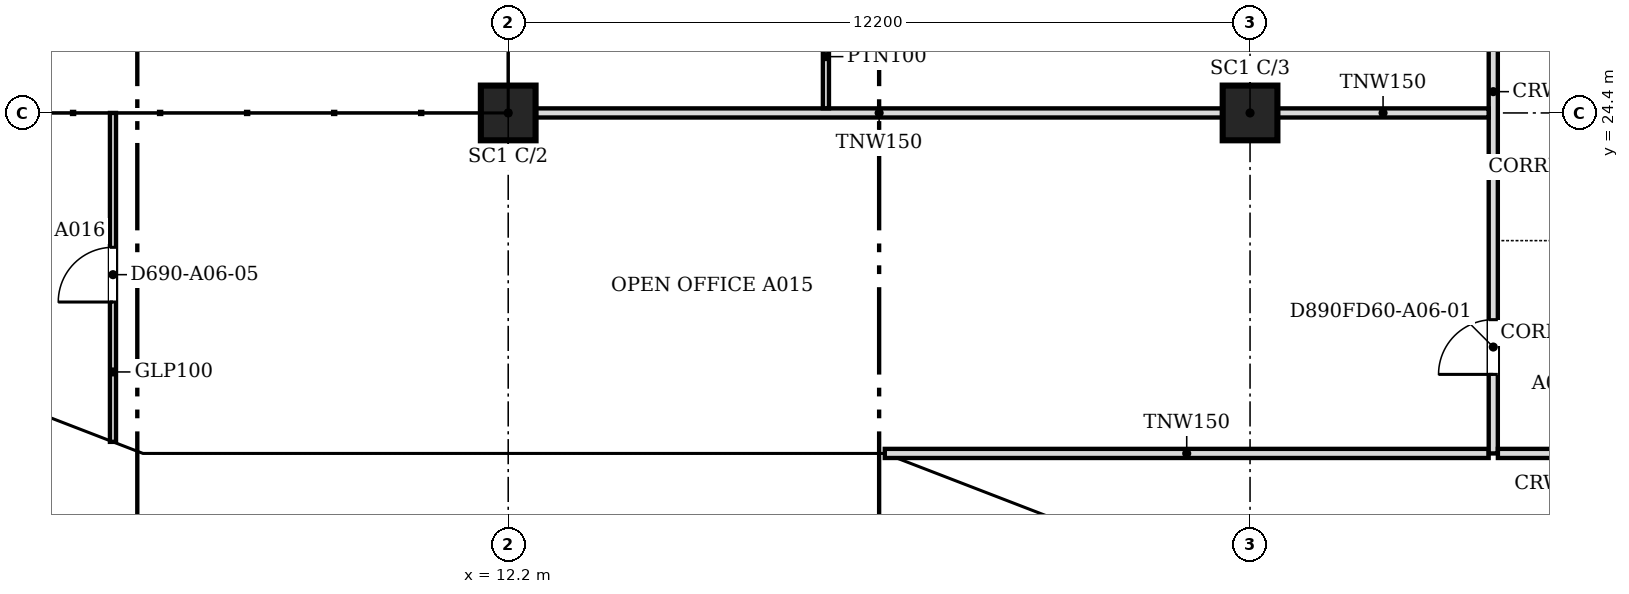
"""IFC4 building model, lengths in metres.
Left out: names, types, materials, properties, quantities, classifications, styles, units other than length and angle.
Written with IfcOpenShell. Run it as: python <this file> out.ifc"""

import sys

from ifc_helpers import new_model, si_unit, direction, frame, frame_2d, origin, origin_2d, place, context, subcontext, project, spatial, polyline, rectangle, outline, extrude, faceted_brep, source, transform, mapped, element, fill, save


model = new_model("IFC4")
c1 = context("Model", 3, precision=1e-05, world=origin(), true_north=direction((0.0, 1.0)))
c2 = subcontext(c1, "Body", "Model", "MODEL_VIEW")
j1 = project(units=[si_unit("LENGTHUNIT", "METRE"), si_unit("PLANEANGLEUNIT", "RADIAN")], contexts=[c1])
p1 = place(None, origin())
s1 = spatial("IfcSite", under=j1, at=p1, CompositionType="ELEMENT")
p2 = place(p1, origin())
s2 = spatial("IfcBuilding", under=s1, at=p2, CompositionType="ELEMENT")
p3 = place(p2, frame((0.0, 0.0, 68.6)))
s3 = spatial("IfcBuildingStorey", under=s2, at=p3, CompositionType="ELEMENT", Elevation=68.6)
for number, where, z_axis, x_axis in (
    (1, (12.2, 24.4, 0.0), (0.0, 0.0, 1.0), (1.0, 0.0, 0.0)),
    (2, (24.4, 24.4, 0.0), (0.0, 0.0, 1.0), (1.0, 0.0, 0.0)),
):
    element("IfcColumn", number, at=place(p3, frame(where, z_axis=z_axis, x_axis=x_axis)), inside=s3, PredefinedType="COLUMN", context=c2, shape_type="SweptSolid", body=[
        extrude(rectangle(XDim=0.9, YDim=0.9, at=origin_2d()), origin(), (0.0, 0.0, 1.0), 3.6),
    ])
m1 = source(origin(), c2, "Body", "Brep", [
    faceted_brep([(2.997, -0.25, 3.741), (2.95, -0.25, 3.8), (0.0, -0.25, 0.0), (2.997, -0.25, 0.0), (0.053, 0.25, 0.068), (2.904, 0.25, 3.74), (2.904, 0.25, 0.0), (0.053, 0.25, 0.0), (2.95, 0.0, 3.8), (0.0, 0.0, 0.0)], [[[0, 1, 2, 3]], [[4, 5, 6, 7]], [[8, 1, 0]], [[5, 4, 9, 2, 1, 8]], [[7, 6, 3, 2, 9]], [[7, 9, 4]], [[3, 6, 5, 8, 0]]]),
])
p4 = place(p3, frame((3.394, 19.612, 0.0), z_axis=(0.0, 0.0, 1.0), x_axis=(0.932990326376, -0.359901446078, 0.0)))
e3 = element("IfcWall", 3, at=p4, inside=s3, PredefinedType="SOLIDWALL", context=c2, shape_type="MappedRepresentation", body=[
    mapped(m1, transform((0.0, 0.0, 0.0), scale=1.0)),
])
m2 = source(origin(), c2, "Body", "SweptSolid", [
    extrude(outline(polyline([(2.75, 3.135), (0.511, 0.25), (2.75, 0.25), (2.75, 3.135)])), frame((0.0, 0.26, 0.0), z_axis=(0.0, -1.0, 0.0), x_axis=(1.0, 0.0, 0.0)), (0.0, 0.0, 1.0), 0.52),
])
p5 = place(p4, origin())
e4 = element("IfcOpeningElement", 4, at=p5, cuts=e3, PredefinedType="OPENING", context=c2, shape_type="MappedRepresentation", body=[
    mapped(m2, transform((0.0, 0.0, 0.0), scale=1.0)),
])
m3 = source(origin(), c2, "Body", "Brep", [
    faceted_brep([(3.05, -0.25, 0.0), (0.047, -0.25, 3.8), (0.0, -0.25, 3.74), (0.0, -0.25, 0.0), (0.093, 0.25, 3.741), (3.05, 0.25, 0.0), (0.093, 0.25, 0.0), (0.047, 0.0, 3.8)], [[[0, 1, 2, 3]], [[4, 5, 6]], [[5, 4, 7, 1, 0]], [[2, 1, 7]], [[6, 5, 0, 3]], [[6, 3, 2, 7, 4]]]),
])
p6 = place(p3, frame((6.1, 18.55, 0.0), z_axis=(0.0, 0.0, 1.0), x_axis=(1.0, 0.0, 0.0)))
e5 = element("IfcWall", 5, at=p6, inside=s3, PredefinedType="SOLIDWALL", context=c2, shape_type="MappedRepresentation", body=[
    mapped(m3, transform((0.0, 0.0, 0.0), scale=1.0)),
])
m4 = source(origin(), c2, "Body", "SweptSolid", [
    extrude(outline(polyline([(2.534, 0.25), (0.247, 3.144), (0.247, 0.25), (2.534, 0.25)])), frame((0.0, 0.26, 0.0), z_axis=(0.0, -1.0, 0.0), x_axis=(1.0, 0.0, 0.0)), (0.0, 0.0, 1.0), 0.52),
])
p7 = place(p6, origin())
e6 = element("IfcOpeningElement", 6, at=p7, cuts=e5, PredefinedType="OPENING", context=c2, shape_type="MappedRepresentation", body=[
    mapped(m4, transform((0.0, 0.0, 0.0), scale=1.0)),
])
m5 = source(origin(), c2, "Body", "SweptSolid", [
    extrude(outline(polyline([(6.1, 0.0), (3.05, 3.8), (0.0, 0.0), (6.1, 0.0)])), frame((0.0, 0.25, 0.0), z_axis=(0.0, -1.0, 0.0), x_axis=(1.0, 0.0, 0.0)), (0.0, 0.0, 1.0), 0.5),
])
p8 = place(p3, frame((9.15, 18.55, 0.0), z_axis=(0.0, 0.0, 1.0), x_axis=(1.0, 0.0, 0.0)))
e7 = element("IfcWall", 7, at=p8, inside=s3, PredefinedType="SOLIDWALL", context=c2, shape_type="MappedRepresentation", body=[
    mapped(m5, transform((0.0, 0.0, 0.0), scale=1.0)),
])
m6 = source(origin(), c2, "Body", "SweptSolid", [
    extrude(outline(polyline([(5.579, 0.25), (3.05, 3.4), (0.521, 0.25), (5.579, 0.25)])), frame((0.0, 0.26, 0.0), z_axis=(0.0, -1.0, 0.0), x_axis=(1.0, 0.0, 0.0)), (0.0, 0.0, 1.0), 0.52),
])
p9 = place(p8, origin())
e8 = element("IfcOpeningElement", 8, at=p9, cuts=e7, PredefinedType="OPENING", context=c2, shape_type="MappedRepresentation", body=[
    mapped(m6, transform((0.0, 0.0, 0.0), scale=1.0)),
])
m7 = source(origin(), c2, "Body", "Brep", [
    faceted_brep([(3.05, -0.25, 3.743), (0.0, -0.25, 0.0), (3.05, -0.25, 0.0), (0.0, 0.25, 0.0), (3.096, 0.25, 3.8), (3.143, 0.25, 3.743), (3.143, 0.25, 0.0), (3.096, -0.0, 3.8)], [[[0, 1, 2]], [[3, 4, 5, 6]], [[5, 4, 7]], [[4, 3, 1, 0, 7]], [[3, 6, 2, 1]], [[2, 6, 5, 7, 0]]]),
])
p10 = place(p3, frame((15.25, 18.55, 0.0), z_axis=(0.0, 0.0, 1.0), x_axis=(1.0, 0.0, 0.0)))
e9 = element("IfcWall", 9, at=p10, inside=s3, PredefinedType="SOLIDWALL", context=c2, shape_type="MappedRepresentation", body=[
    mapped(m7, transform((0.0, 0.0, 0.0), scale=1.0)),
])
m8 = source(origin(), c2, "Body", "SweptSolid", [
    extrude(outline(polyline([(2.896, 3.159), (0.526, 0.25), (2.896, 0.25), (2.896, 3.159)])), frame((0.0, 0.26, 0.0), z_axis=(0.0, -1.0, 0.0), x_axis=(1.0, 0.0, 0.0)), (0.0, 0.0, 1.0), 0.52),
])
p11 = place(p10, origin())
e10 = element("IfcOpeningElement", 10, at=p11, cuts=e9, PredefinedType="OPENING", context=c2, shape_type="MappedRepresentation", body=[
    mapped(m8, transform((0.0, 0.0, 0.0), scale=1.0)),
])
m9 = source(origin(), c2, "Body", "Brep", [
    faceted_brep([(3.143, -0.25, 0.064), (0.093, -0.25, 3.744), (0.093, -0.25, 0.0), (3.143, -0.25, 0.0), (0.0, 0.25, 3.743), (0.047, 0.25, 3.8), (3.196, 0.25, 0.0), (0.0, 0.25, 0.0), (0.047, 0.0, 3.8), (3.196, -0.0, 0.0)], [[[0, 1, 2, 3]], [[4, 5, 6, 7]], [[6, 5, 8, 1, 0, 9]], [[5, 4, 8]], [[7, 6, 9, 3, 2]], [[7, 2, 1, 8, 4]], [[3, 9, 0]]]),
])
p12 = place(p3, frame((18.303, 18.567, 0.0), z_axis=(0.0, 0.0, 1.0), x_axis=(0.932978940178, -0.359930961693, 0.0)))
e11 = element("IfcWall", 11, at=p12, inside=s3, PredefinedType="SOLIDWALL", context=c2, shape_type="MappedRepresentation", body=[
    mapped(m9, transform((0.0, 0.0, 0.0), scale=1.0)),
])
m10 = source(origin(), c2, "Body", "SweptSolid", [
    extrude(outline(polyline([(2.664, 0.25), (0.247, 3.167), (0.247, 0.25), (2.664, 0.25)])), frame((0.0, 0.26, 0.0), z_axis=(0.0, -1.0, 0.0), x_axis=(1.0, 0.0, 0.0)), (0.0, 0.0, 1.0), 0.52),
])
p13 = place(p12, origin())
e12 = element("IfcOpeningElement", 12, at=p13, cuts=e11, PredefinedType="OPENING", context=c2, shape_type="MappedRepresentation", body=[
    mapped(m10, transform((0.0, 0.0, 0.0), scale=1.0)),
])
p14 = place(p2, frame((0.0, 0.0, 72.4)))
s4 = spatial("IfcBuildingStorey", under=s2, at=p14, CompositionType="ELEMENT", Elevation=72.4)
m11 = source(origin(), c2, "Body", "Brep", [
    faceted_brep([(0.053, -0.25, 0.0), (3.003, -0.25, 3.8), (0.053, -0.25, 7.6), (0.0, -0.25, 7.531), (0.0, -0.25, 0.068), (0.106, 0.25, 7.532), (2.957, 0.25, 3.86), (2.957, 0.25, 3.74), (0.106, 0.25, 0.068), (3.003, 0.0, 3.8), (0.053, 0.0, 0.0), (0.053, 0.0, 7.6)], [[[0, 1, 2, 3, 4]], [[5, 6, 7, 8]], [[8, 7, 9, 1, 0, 10]], [[6, 5, 11, 2, 1, 9]], [[3, 2, 11]], [[10, 0, 4]], [[8, 10, 4, 3, 11, 5]], [[9, 7, 6]]]),
])
p15 = place(p14, frame((3.344, 19.631, -3.8), z_axis=(0.0, 0.0, 1.0), x_axis=(0.933007896601, -0.359855894603, 0.0)))
e13 = element("IfcWall", 13, at=p15, inside=s4, PredefinedType="SOLIDWALL", context=c2, shape_type="MappedRepresentation", body=[
    mapped(m11, transform((0.0, 0.0, 0.0), scale=1.0)),
])
m12 = source(origin(), c2, "Body", "SweptSolid", [
    extrude(outline(polyline([(0.253, 0.665), (2.687, 3.8), (0.253, 6.935), (0.253, 0.665)])), frame((0.0, 0.26, 0.0), z_axis=(0.0, -1.0, 0.0), x_axis=(1.0, 0.0, 0.0)), (0.0, 0.0, 1.0), 0.52),
])
p16 = place(p15, origin())
e14 = element("IfcOpeningElement", 14, at=p16, cuts=e13, PredefinedType="OPENING", context=c2, shape_type="MappedRepresentation", body=[
    mapped(m12, transform((0.0, 0.0, 0.0), scale=1.0)),
])
m13 = source(origin(), c2, "Body", "Brep", [
    faceted_brep([(3.003, -0.25, 0.0), (6.053, -0.25, 3.8), (3.003, -0.25, 7.6), (0.0, -0.25, 3.8), (0.047, 0.25, 3.859), (3.003, 0.25, 7.6), (6.053, 0.25, 3.8), (3.003, 0.25, 0.0), (0.047, 0.25, 3.741), (0.0, 0.0, 3.8)], [[[0, 1, 2, 3]], [[4, 5, 6, 7, 8]], [[7, 6, 1, 0]], [[6, 5, 2, 1]], [[5, 4, 9, 3, 2]], [[8, 7, 0, 3, 9]], [[8, 9, 4]]]),
])
p17 = place(p14, frame((6.146, 18.55, -3.8), z_axis=(0.0, 0.0, 1.0), x_axis=(1.0, 0.0, 0.0)))
e15 = element("IfcWall", 15, at=p17, inside=s4, PredefinedType="SOLIDWALL", context=c2, shape_type="MappedRepresentation", body=[
    mapped(m13, transform((0.0, 0.0, 0.0), scale=1.0)),
])
m14 = source(origin(), c2, "Body", "SweptSolid", [
    extrude(outline(polyline([(3.005, 0.401), (5.733, 3.8), (3.005, 7.199), (0.319, 3.8), (3.005, 0.401)])), frame((0.0, 0.26, 0.0), z_axis=(0.0, -1.0, 0.0), x_axis=(1.0, 0.0, 0.0)), (0.0, 0.0, 1.0), 0.52),
])
p18 = place(p17, origin())
e16 = element("IfcOpeningElement", 16, at=p18, cuts=e15, PredefinedType="OPENING", context=c2, shape_type="MappedRepresentation", body=[
    mapped(m14, transform((0.0, 0.0, 0.0), scale=1.0)),
])
m15 = source(origin(), c2, "Body", "Brep", [
    faceted_brep([(3.05, -0.25, 0.0), (6.1, -0.25, 3.743), (6.1, -0.25, 3.857), (3.05, -0.25, 7.6), (0.0, -0.25, 3.8), (0.0, 0.25, 3.8), (3.05, 0.25, 7.6), (6.146, 0.25, 3.8), (3.05, 0.25, 0.0), (6.146, -0.0, 3.8)], [[[0, 1, 2, 3, 4]], [[5, 6, 7, 8]], [[8, 7, 9, 1, 0]], [[7, 6, 3, 2, 9]], [[6, 5, 4, 3]], [[5, 8, 0, 4]], [[1, 9, 2]]]),
])
p19 = place(p14, frame((12.2, 18.55, -3.8), z_axis=(0.0, 0.0, 1.0), x_axis=(1.0, 0.0, 0.0)))
e17 = element("IfcWall", 17, at=p19, inside=s4, PredefinedType="SOLIDWALL", context=c2, shape_type="MappedRepresentation", body=[
    mapped(m15, transform((0.0, 0.0, 0.0), scale=1.0)),
])
m16 = source(origin(), c2, "Body", "SweptSolid", [
    extrude(outline(polyline([(3.052, 0.397), (5.824, 3.8), (3.052, 7.202), (0.321, 3.8), (3.052, 0.397)])), frame((0.0, 0.26, 0.0), z_axis=(0.0, -1.0, 0.0), x_axis=(1.0, 0.0, 0.0)), (0.0, 0.0, 1.0), 0.52),
])
p20 = place(p19, origin())
e18 = element("IfcOpeningElement", 18, at=p20, cuts=e17, PredefinedType="OPENING", context=c2, shape_type="MappedRepresentation", body=[
    mapped(m16, transform((0.0, 0.0, 0.0), scale=1.0)),
])
m17 = source(origin(), c2, "Body", "Brep", [
    faceted_brep([(3.096, -0.25, 7.536), (0.047, -0.25, 3.856), (0.047, -0.25, 3.744), (3.096, -0.25, 0.064), (0.0, 0.25, 3.8), (3.149, 0.25, 7.6), (3.202, 0.25, 7.536), (3.202, 0.25, 0.064), (3.149, 0.25, 0.0), (3.149, -0.0, 0.0), (3.149, -0.0, 7.6), (0.0, 0.0, 3.8)], [[[0, 1, 2, 3]], [[4, 5, 6, 7, 8]], [[8, 7, 9]], [[6, 5, 10]], [[5, 4, 11, 1, 0, 10]], [[4, 8, 9, 3, 2, 11]], [[11, 2, 1]], [[3, 9, 7, 6, 10, 0]]]),
])
p21 = place(p14, frame((18.346, 18.55, -3.8), z_axis=(0.0, 0.0, 1.0), x_axis=(0.932985567668, -0.359913782069, 0.0)))
e19 = element("IfcWall", 19, at=p21, inside=s4, PredefinedType="SOLIDWALL", context=c2, shape_type="MappedRepresentation", body=[
    mapped(m17, transform((0.0, 0.0, 0.0), scale=1.0)),
])
m18 = source(origin(), c2, "Body", "SweptSolid", [
    extrude(outline(polyline([(2.949, 6.967), (0.325, 3.8), (2.949, 0.633), (2.949, 6.967)])), frame((0.0, 0.26, 0.0), z_axis=(0.0, -1.0, 0.0), x_axis=(1.0, 0.0, 0.0)), (0.0, 0.0, 1.0), 0.52),
])
p22 = place(p21, origin())
e20 = element("IfcOpeningElement", 20, at=p22, cuts=e19, PredefinedType="OPENING", context=c2, shape_type="MappedRepresentation", body=[
    mapped(m18, transform((0.0, 0.0, 0.0), scale=1.0)),
])
p23 = place(p3, frame((18.393, 18.8, 0.0), z_axis=(0.0, 0.0, 1.0), x_axis=(1.0, 0.0, 0.0)))
e21 = element("IfcWall", 21, at=p23, inside=s3, PredefinedType="PARTITIONING", context=c2, shape_type="SweptSolid", body=[
    extrude(rectangle(XDim=9.931, YDim=0.15, at=frame_2d((4.965, 0.0))), origin(), (0.0, 0.0, 1.0), 3.067),
])
p24 = place(p3, frame((28.4, 18.8, 0.0), z_axis=(0.0, 0.0, 1.0), x_axis=(0.0, 1.0, 0.0)))
e22 = element("IfcWall", 22, at=p24, inside=s3, PredefinedType="PARTITIONING", context=c2, shape_type="SweptSolid", body=[
    extrude(rectangle(XDim=26.824, YDim=0.15, at=frame_2d((13.412, 0.0))), origin(), (0.0, 0.0, 1.0), 3.067),
])
m19 = source(origin(), c2, "Body", "SweptSolid", [
    extrude(rectangle(XDim=0.9, YDim=2.1, at=frame_2d((0.45, 1.05))), frame((0.0, 0.085, 0.0), z_axis=(0.0, -1.0, 0.0), x_axis=(1.0, 0.0, 0.0)), (0.0, 0.0, 1.0), 0.17),
])
p25 = place(p24, frame((1.3, 0.0, 0.0)))
e23 = element("IfcOpeningElement", 23, at=p25, cuts=e22, PredefinedType="OPENING", context=c2, shape_type="MappedRepresentation", body=[
    mapped(m19, transform((0.0, 0.0, 0.0), scale=1.0)),
])
p26 = place(p24, frame((23.351, 0.0, 0.0)))
e24 = element("IfcOpeningElement", 24, at=p26, cuts=e22, PredefinedType="OPENING", context=c2, shape_type="MappedRepresentation", body=[
    mapped(m19, transform((0.0, 0.0, 0.0), scale=1.0)),
])
p27 = place(p24, frame((17.351, 0.0, 0.0)))
e25 = element("IfcOpeningElement", 25, at=p27, cuts=e22, PredefinedType="OPENING", context=c2, shape_type="MappedRepresentation", body=[
    mapped(m19, transform((0.0, 0.0, 0.0), scale=1.0)),
])
p28 = place(p24, frame((9.7, 0.0, 0.0)))
e26 = element("IfcOpeningElement", 26, at=p28, cuts=e22, PredefinedType="OPENING", context=c2, shape_type="MappedRepresentation", body=[
    mapped(m19, transform((0.0, 0.0, 0.0), scale=1.0)),
])
p29 = place(p3, frame((28.476, 18.8, 0.0), z_axis=(0.0, 0.0, 1.0), x_axis=(1.0, 0.0, 0.0)))
e27 = element("IfcWall", 27, at=p29, inside=s3, PredefinedType="PARTITIONING", context=c2, shape_type="SweptSolid", body=[
    extrude(rectangle(XDim=1.948, YDim=0.15, at=frame_2d((0.974, 0.0))), origin(), (0.0, 0.0, 1.0), 3.067),
])
p30 = place(p3, frame((5.7, 18.99, 0.0), z_axis=(0.0, 0.0, 1.0), x_axis=(0.0, 1.0, 0.0)))
e28 = element("IfcWall", 28, at=p30, inside=s3, PredefinedType="PARTITIONING", context=c2, shape_type="SweptSolid", body=[
    extrude(rectangle(XDim=5.41, YDim=0.1, at=frame_2d((2.705, 0.0))), origin(), (0.0, 0.0, 1.0), 3.067),
])
m20 = source(origin(), c2, "Body", "SweptSolid", [
    extrude(rectangle(XDim=0.9, YDim=2.1, at=frame_2d((0.45, 1.05))), frame((0.0, 0.06, 0.0), z_axis=(0.0, -1.0, 0.0), x_axis=(1.0, 0.0, 0.0)), (0.0, 0.0, 1.0), 0.12),
])
p31 = place(p30, frame((2.3, 0.0, 0.0)))
e29 = element("IfcOpeningElement", 29, at=p31, cuts=e28, PredefinedType="OPENING", context=c2, shape_type="MappedRepresentation", body=[
    mapped(m20, transform((0.0, 0.0, 0.0), scale=1.0)),
])
p32 = place(p3, frame((12.651, 24.4, 0.0), z_axis=(0.0, 0.0, 1.0), x_axis=(1.0, 0.0, 0.0)))
e30 = element("IfcWall", 30, at=p32, inside=s3, PredefinedType="PARTITIONING", context=c2, shape_type="SweptSolid", body=[
    extrude(rectangle(XDim=11.298, YDim=0.15, at=frame_2d((5.649, 0.0))), origin(), (0.0, 0.0, 1.0), 3.067),
])
p33 = place(p3, frame((24.851, 24.4, 0.0), z_axis=(0.0, 0.0, 1.0), x_axis=(1.0, 0.0, 0.0)))
e31 = element("IfcWall", 31, at=p33, inside=s3, PredefinedType="PARTITIONING", context=c2, shape_type="SweptSolid", body=[
    extrude(rectangle(XDim=3.473, YDim=0.15, at=frame_2d((1.736, 0.0))), origin(), (0.0, 0.0, 1.0), 3.067),
])
p34 = place(p3, frame((17.425, 24.476, 0.0), z_axis=(0.0, 0.0, 1.0), x_axis=(0.0, 1.0, 0.0)))
e32 = element("IfcWall", 32, at=p34, inside=s3, PredefinedType="PARTITIONING", context=c2, shape_type="SweptSolid", body=[
    extrude(rectangle(XDim=4.293, YDim=0.1, at=frame_2d((2.146, 0.0))), origin(), (0.0, 0.0, 1.0), 3.067),
])
p35 = place(p34, frame((1.7, 0.0, 0.0)))
e33 = element("IfcOpeningElement", 33, at=p35, cuts=e32, PredefinedType="OPENING", context=c2, shape_type="MappedRepresentation", body=[
    mapped(m20, transform((0.0, 0.0, 0.0), scale=1.0)),
])
m21 = source(origin(), c2, "Body", "SweptSolid", [
    extrude(rectangle(XDim=0.9, YDim=2.1, at=frame_2d((0.45, 1.05))), frame((0.0, 0.025, 0.0), z_axis=(0.0, -1.0, 0.0), x_axis=(1.0, 0.0, 0.0)), (0.0, 0.0, 1.0), 0.05),
])
p36 = place(p25, origin())
e34 = element("IfcDoor", 34, at=p36, inside=s3, OperationType="SINGLE_SWING_LEFT", PredefinedType="DOOR", context=c2, shape_type="MappedRepresentation", body=[
    mapped(m21, transform((0.0, 0.0, 0.0), scale=1.0)),
])
fill(e23, e34)
p37 = place(p31, origin())
e35 = element("IfcDoor", 35, at=p37, inside=s3, OperationType="SINGLE_SWING_LEFT", PredefinedType="DOOR", context=c2, shape_type="MappedRepresentation", body=[
    mapped(m21, transform((0.0, 0.0, 0.0), scale=1.0)),
])
fill(e29, e35)
save(model, sys.argv[1])
